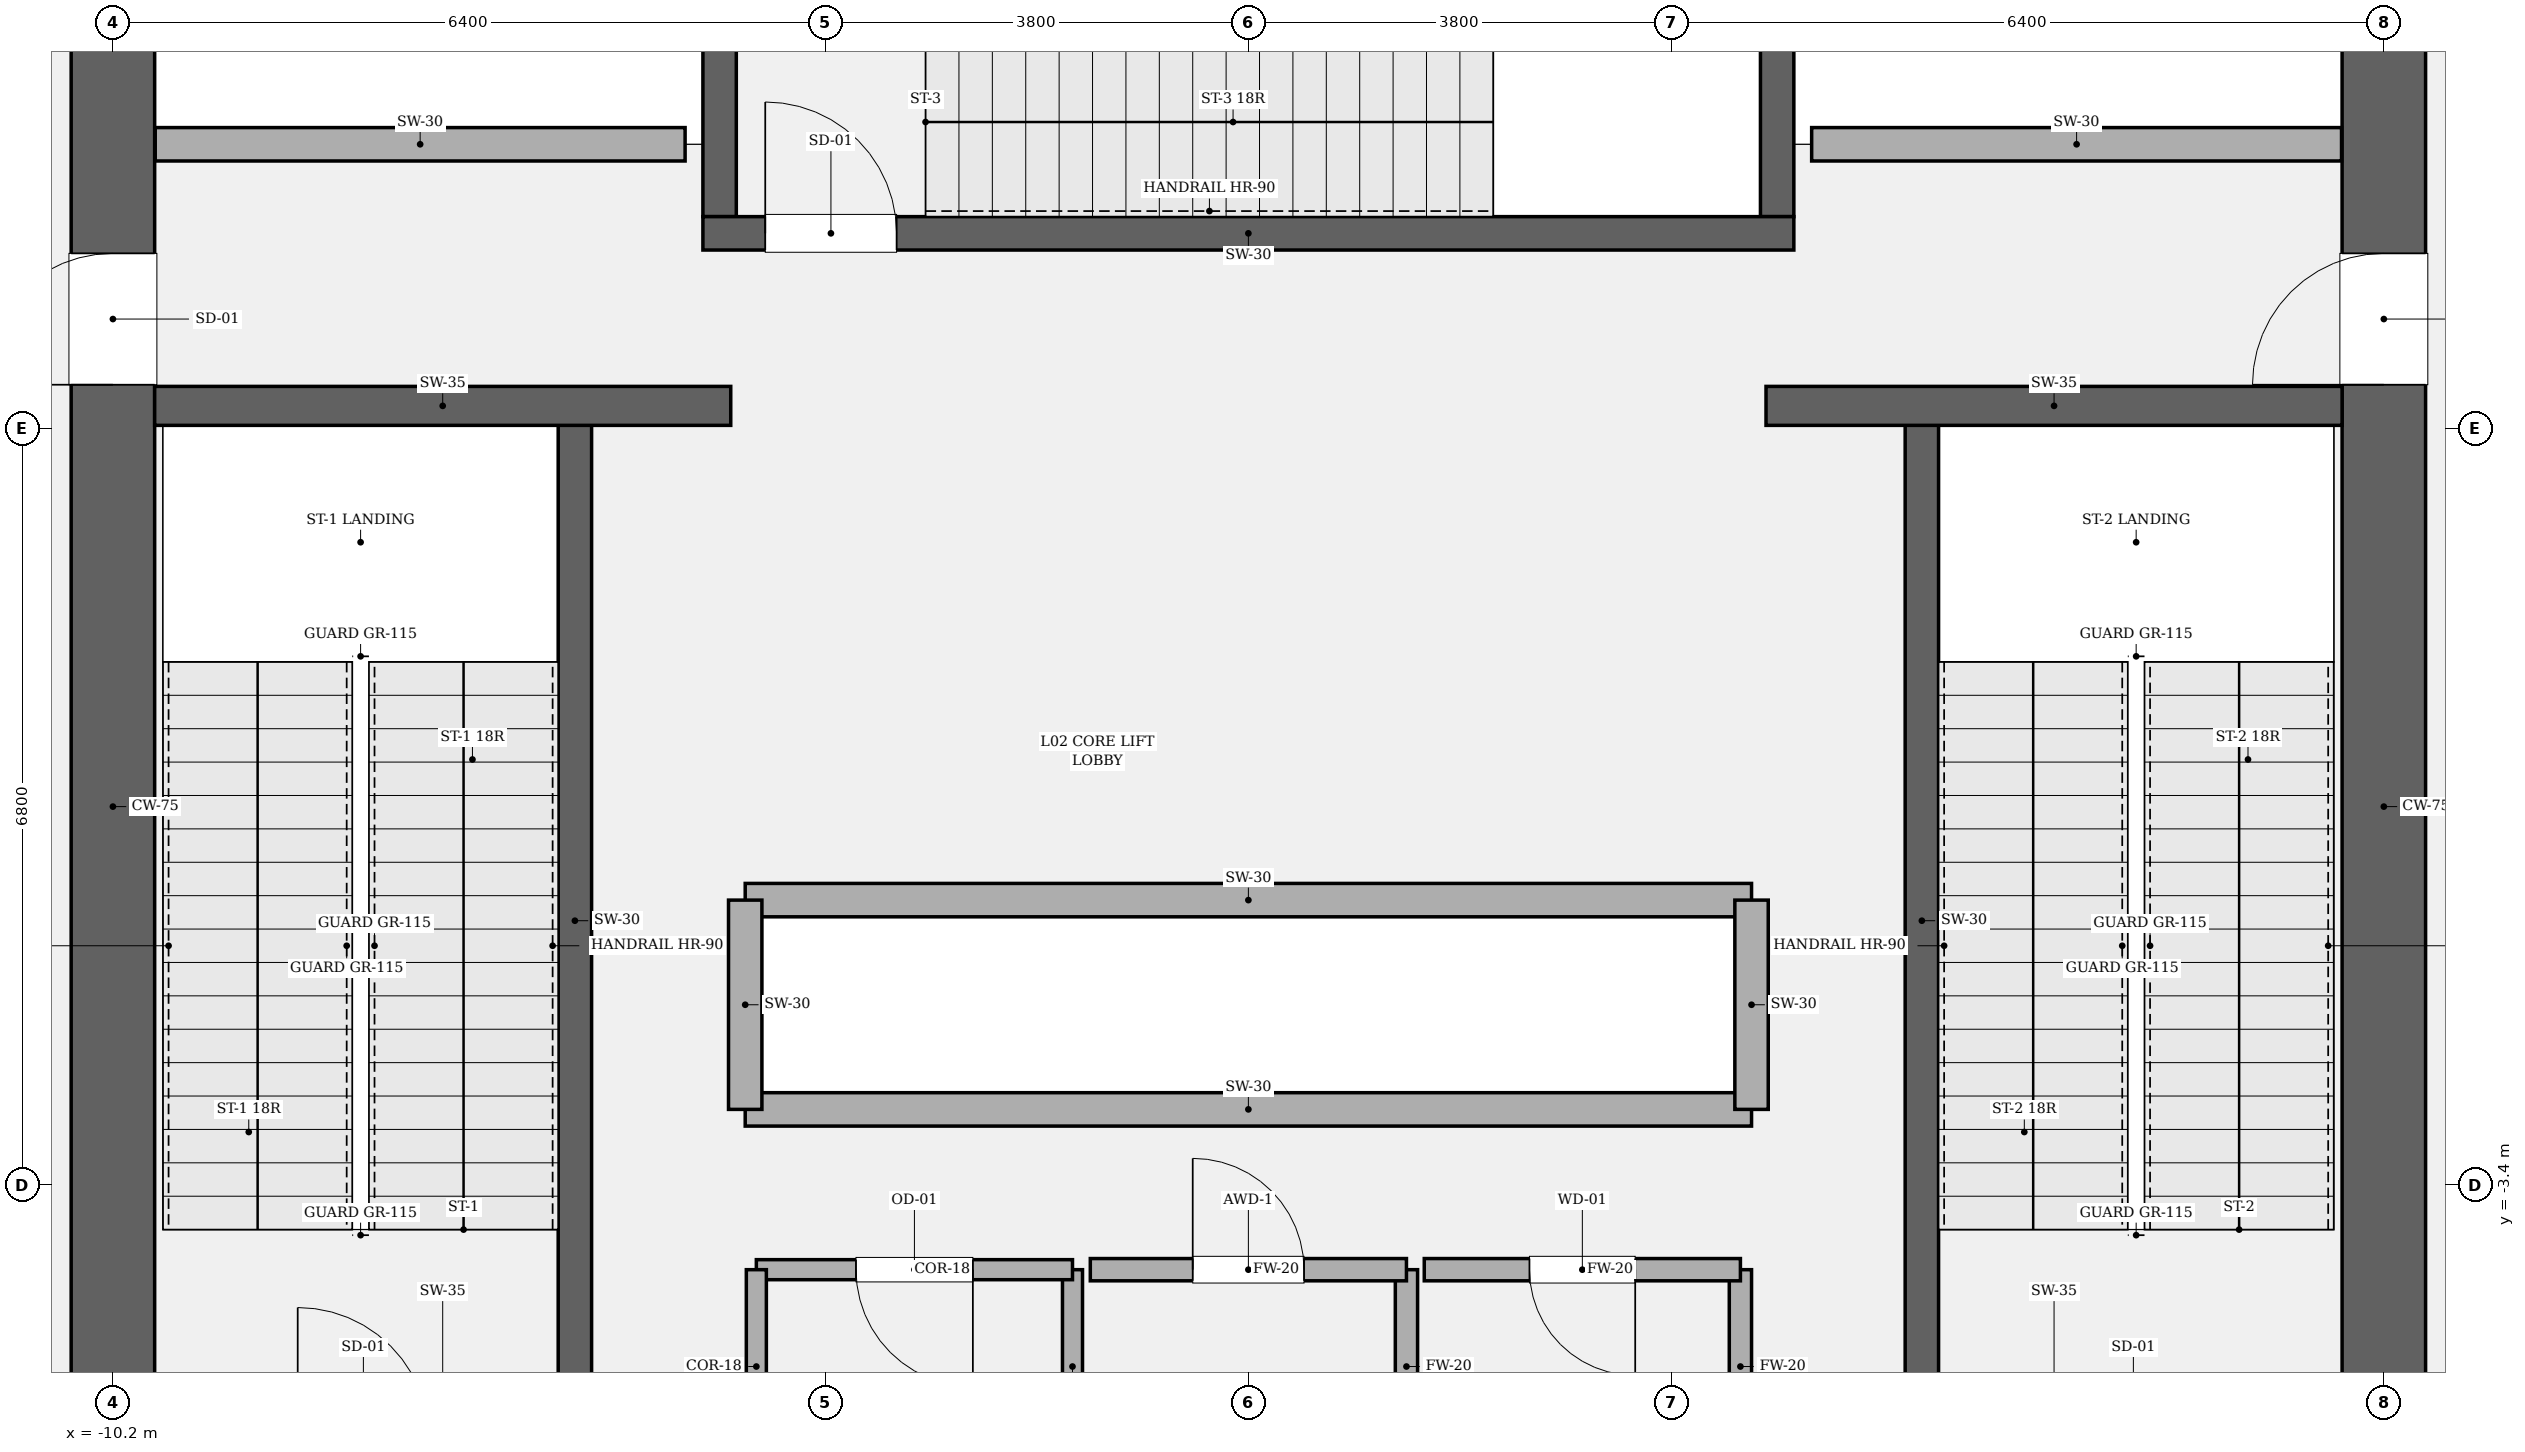
"""IFC4 building model, lengths in metres.
Left out: names, types, materials, properties, quantities, classifications, styles, units other than length and angle.
Written with IfcOpenShell. Run it as: python <this file> out.ifc"""

import sys

from ifc_helpers import new_model, si_unit, direction, frame, frame_2d, origin, place, context, subcontext, project, spatial, rectangle, extrude, element, fill, save


model = new_model("IFC4")
c1 = context("Model", 3, precision=1e-05, world=origin(), true_north=direction((0.0, 1.0)))
c2 = subcontext(c1, "Body", "Model", "MODEL_VIEW")
j1 = project(units=[si_unit("LENGTHUNIT", "METRE"), si_unit("PLANEANGLEUNIT", "RADIAN")], contexts=[c1])
p1 = place(None, origin())
s1 = spatial("IfcSite", under=j1, at=p1, CompositionType="ELEMENT")
p2 = place(p1, origin())
s2 = spatial("IfcBuilding", under=s1, at=p2, CompositionType="ELEMENT")
p3 = place(p2, frame((0.0, 0.0, 11.4)))
s3 = spatial("IfcBuildingStorey", under=s2, at=p3, CompositionType="ELEMENT", Elevation=11.4)
p4 = place(p3, frame((-10.2, -8.825, 0.0), z_axis=(0.0, 0.0, 1.0), x_axis=(0.0, 1.0, 0.0)))
e1 = element("IfcWall", 1, at=p4, inside=s3, PredefinedType="SHEAR", context=c2, shape_type="SweptSolid", body=[
    extrude(rectangle(XDim=17.65, YDim=0.75, at=frame_2d((8.825, 0.0))), origin(), (0.0, 0.0, 1.0), 5.4),
])
p5 = place(p4, frame((12.615, 0.0, 0.0)))
e2 = element("IfcOpeningElement", 2, at=p5, cuts=e1, PredefinedType="OPENING", context=c2, shape_type="SweptSolid", body=[
    extrude(rectangle(XDim=1.18, YDim=2.2, at=frame_2d((0.59, 1.1))), frame((0.0, 0.385, 0.0), z_axis=(0.0, -1.0, 0.0), x_axis=(1.0, 0.0, 0.0)), (0.0, 0.0, 1.0), 0.77),
])
p6 = place(p3, frame((10.2, 8.825, 0.0), z_axis=(0.0, 0.0, 1.0), x_axis=(0.0, -1.0, 0.0)))
e3 = element("IfcWall", 3, at=p6, inside=s3, PredefinedType="SHEAR", context=c2, shape_type="SweptSolid", body=[
    extrude(rectangle(XDim=17.65, YDim=0.75, at=frame_2d((8.825, 0.0))), origin(), (0.0, 0.0, 1.0), 5.4),
])
p7 = place(p6, frame((3.855, 0.0, 0.0)))
e4 = element("IfcOpeningElement", 4, at=p7, cuts=e3, PredefinedType="OPENING", context=c2, shape_type="SweptSolid", body=[
    extrude(rectangle(XDim=1.18, YDim=2.2, at=frame_2d((0.59, 1.1))), frame((0.0, 0.385, 0.0), z_axis=(0.0, -1.0, 0.0), x_axis=(1.0, 0.0, 0.0)), (0.0, 0.0, 1.0), 0.77),
])
for number, where, z_axis, x_axis in (
    (5, (-6.05, -5.5, 0.0), (0.0, 0.0, 1.0), (0.0, 1.0, 0.0)),
    (6, (6.05, 3.45, 0.0), (0.0, 0.0, 1.0), (0.0, -1.0, 0.0)),
):
    element("IfcWall", number, at=place(p3, frame(where, z_axis=z_axis, x_axis=x_axis)), inside=s3, PredefinedType="SOLIDWALL", context=c2, shape_type="SweptSolid", body=[
        extrude(rectangle(XDim=8.95, YDim=0.3, at=frame_2d((4.475, 0.0))), origin(), (0.0, 0.0, 1.0), 5.4),
    ])
for number, where, z_axis, x_axis in (
    (7, (-4.75, 5.3, 0.0), (0.0, 0.0, 1.0), (0.0, 1.0, 0.0)),
    (8, (4.75, 8.825, 0.0), (0.0, 0.0, 1.0), (0.0, -1.0, 0.0)),
):
    element("IfcWall", number, at=place(p3, frame(where, z_axis=z_axis, x_axis=x_axis)), inside=s3, PredefinedType="SOLIDWALL", context=c2, shape_type="SweptSolid", body=[
        extrude(rectangle(XDim=3.525, YDim=0.3, at=frame_2d((1.762, 0.0))), origin(), (0.0, 0.0, 1.0), 5.4),
    ])
p8 = place(p3, frame((-4.9, 5.15, 0.0), z_axis=(0.0, 0.0, 1.0), x_axis=(1.0, 0.0, 0.0)))
e9 = element("IfcWall", 9, at=p8, inside=s3, PredefinedType="SOLIDWALL", context=c2, shape_type="SweptSolid", body=[
    extrude(rectangle(XDim=9.8, YDim=0.3, at=frame_2d((4.9, 0.0))), origin(), (0.0, 0.0, 1.0), 5.4),
])
p9 = place(p8, frame((0.56, 0.0, 0.0)))
e10 = element("IfcOpeningElement", 10, at=p9, cuts=e9, PredefinedType="OPENING", context=c2, shape_type="SweptSolid", body=[
    extrude(rectangle(XDim=1.18, YDim=2.2, at=frame_2d((0.59, 1.1))), frame((0.0, 0.16, 0.0), z_axis=(0.0, -1.0, 0.0), x_axis=(1.0, 0.0, 0.0)), (0.0, 0.0, 1.0), 0.32),
])
for number, where, z_axis, x_axis in (
    (11, (-9.825, 3.6, 0.0), (0.0, 0.0, 1.0), (1.0, 0.0, 0.0)),
    (12, (4.65, 3.6, 0.0), (0.0, 0.0, 1.0), (1.0, 0.0, 0.0)),
):
    element("IfcWall", number, at=place(p3, frame(where, z_axis=z_axis, x_axis=x_axis)), inside=s3, PredefinedType="SOLIDWALL", context=c2, shape_type="SweptSolid", body=[
        extrude(rectangle(XDim=5.175, YDim=0.35, at=frame_2d((2.587, 0.0))), origin(), (0.0, 0.0, 1.0), 5.4),
    ])
for number, where, z_axis, x_axis in (
    (13, (-4.52, -0.84, 0.0), (0.0, 0.0, 1.0), (1.0, 0.0, 0.0)),
    (14, (-4.52, -2.72, 0.0), (0.0, 0.0, 1.0), (1.0, 0.0, 0.0)),
):
    element("IfcWall", number, at=place(p3, frame(where, z_axis=z_axis, x_axis=x_axis)), inside=s3, PredefinedType="SOLIDWALL", context=c2, shape_type="SweptSolid", body=[
        extrude(rectangle(XDim=9.04, YDim=0.3, at=frame_2d((4.52, 0.0))), origin(), (0.0, 0.0, 1.0), 5.12),
    ])
for number, where, z_axis, x_axis in (
    (15, (-4.52, -2.72, 0.0), (0.0, 0.0, 1.0), (0.0, 1.0, 0.0)),
    (16, (4.52, -2.72, 0.0), (0.0, 0.0, 1.0), (0.0, 1.0, 0.0)),
):
    element("IfcWall", number, at=place(p3, frame(where, z_axis=z_axis, x_axis=x_axis)), inside=s3, PredefinedType="SOLIDWALL", context=c2, shape_type="SweptSolid", body=[
        extrude(rectangle(XDim=1.88, YDim=0.3, at=frame_2d((0.94, 0.0))), origin(), (0.0, 0.0, 1.0), 5.12),
    ])
for number, where, z_axis, x_axis in (
    (17, (-9.82, 5.95, 0.0), (0.0, 0.0, 1.0), (1.0, 0.0, 0.0)),
    (18, (5.06, 5.95, 0.0), (0.0, 0.0, 1.0), (1.0, 0.0, 0.0)),
):
    element("IfcWall", number, at=place(p3, frame(where, z_axis=z_axis, x_axis=x_axis)), inside=s3, PredefinedType="SOLIDWALL", context=c2, shape_type="SweptSolid", body=[
        extrude(rectangle(XDim=4.76, YDim=0.3, at=frame_2d((2.38, 0.0))), origin(), (0.0, 0.0, 1.0), 5.12),
    ])
p10 = place(p3, frame((-1.58, -5.9, 0.0), z_axis=(0.0, 0.0, 1.0), x_axis=(0.0, 1.0, 0.0)))
e19 = element("IfcWall", 19, at=p10, inside=s3, PredefinedType="PARTITIONING", context=c2, shape_type="SweptSolid", body=[
    extrude(rectangle(XDim=1.74, YDim=0.18, at=frame_2d((0.87, 0.0))), origin(), (0.0, 0.0, 1.0), 5.12),
])
p11 = place(p3, frame((-1.58, -4.16, 0.0), z_axis=(0.0, 0.0, 1.0), x_axis=(-1.0, 0.0, 0.0)))
e20 = element("IfcWall", 20, at=p11, inside=s3, PredefinedType="PARTITIONING", context=c2, shape_type="SweptSolid", body=[
    extrude(rectangle(XDim=2.84, YDim=0.18, at=frame_2d((1.42, 0.0))), origin(), (0.0, 0.0, 1.0), 5.12),
])
p12 = place(p11, frame((0.895, 0.0, 0.0)))
e21 = element("IfcOpeningElement", 21, at=p12, cuts=e20, PredefinedType="OPENING", context=c2, shape_type="SweptSolid", body=[
    extrude(rectangle(XDim=1.05, YDim=2.2, at=frame_2d((0.525, 1.1))), frame((0.0, 0.1, 0.0), z_axis=(0.0, -1.0, 0.0), x_axis=(1.0, 0.0, 0.0)), (0.0, 0.0, 1.0), 0.2),
])
p13 = place(p3, frame((-4.42, -4.16, 0.0), z_axis=(0.0, 0.0, 1.0), x_axis=(0.0, -1.0, 0.0)))
e22 = element("IfcWall", 22, at=p13, inside=s3, PredefinedType="PARTITIONING", context=c2, shape_type="SweptSolid", body=[
    extrude(rectangle(XDim=1.74, YDim=0.18, at=frame_2d((0.87, 0.0))), origin(), (0.0, 0.0, 1.0), 5.12),
])
p14 = place(p3, frame((1.42, -5.9, 0.0), z_axis=(0.0, 0.0, 1.0), x_axis=(0.0, 1.0, 0.0)))
e23 = element("IfcWall", 23, at=p14, inside=s3, PredefinedType="SOLIDWALL", context=c2, shape_type="SweptSolid", body=[
    extrude(rectangle(XDim=1.74, YDim=0.2, at=frame_2d((0.87, 0.0))), origin(), (0.0, 0.0, 1.0), 5.12),
])
p15 = place(p3, frame((1.42, -4.16, 0.0), z_axis=(0.0, 0.0, 1.0), x_axis=(-1.0, 0.0, 0.0)))
e24 = element("IfcWall", 24, at=p15, inside=s3, PredefinedType="SOLIDWALL", context=c2, shape_type="SweptSolid", body=[
    extrude(rectangle(XDim=2.84, YDim=0.2, at=frame_2d((1.42, 0.0))), origin(), (0.0, 0.0, 1.0), 5.12),
])
p16 = place(p15, frame((0.92, 0.0, 0.0)))
e25 = element("IfcOpeningElement", 25, at=p16, cuts=e24, PredefinedType="OPENING", context=c2, shape_type="SweptSolid", body=[
    extrude(rectangle(XDim=1.0, YDim=2.15, at=frame_2d((0.5, 1.075))), frame((0.0, 0.11, 0.0), z_axis=(0.0, -1.0, 0.0), x_axis=(1.0, 0.0, 0.0)), (0.0, 0.0, 1.0), 0.22),
])
p17 = place(p3, frame((4.42, -5.9, 0.0), z_axis=(0.0, 0.0, 1.0), x_axis=(0.0, 1.0, 0.0)))
e26 = element("IfcWall", 26, at=p17, inside=s3, PredefinedType="SOLIDWALL", context=c2, shape_type="SweptSolid", body=[
    extrude(rectangle(XDim=1.74, YDim=0.2, at=frame_2d((0.87, 0.0))), origin(), (0.0, 0.0, 1.0), 5.12),
])
p18 = place(p3, frame((4.42, -4.16, 0.0), z_axis=(0.0, 0.0, 1.0), x_axis=(-1.0, 0.0, 0.0)))
e27 = element("IfcWall", 27, at=p18, inside=s3, PredefinedType="SOLIDWALL", context=c2, shape_type="SweptSolid", body=[
    extrude(rectangle(XDim=2.84, YDim=0.2, at=frame_2d((1.42, 0.0))), origin(), (0.0, 0.0, 1.0), 5.12),
])
p19 = place(p18, frame((0.945, 0.0, 0.0)))
e28 = element("IfcOpeningElement", 28, at=p19, cuts=e27, PredefinedType="OPENING", context=c2, shape_type="SweptSolid", body=[
    extrude(rectangle(XDim=0.95, YDim=2.15, at=frame_2d((0.475, 1.075))), frame((0.0, 0.11, 0.0), z_axis=(0.0, -1.0, 0.0), x_axis=(1.0, 0.0, 0.0)), (0.0, 0.0, 1.0), 0.22),
])
p20 = place(p9, origin())
e29 = element("IfcDoor", 29, at=p20, inside=s3, OperationType="SINGLE_SWING_LEFT", PredefinedType="DOOR", context=c2, shape_type="SweptSolid", body=[
    extrude(rectangle(XDim=1.18, YDim=2.2, at=frame_2d((0.59, 1.1))), frame((0.0, 0.025, 0.0), z_axis=(0.0, -1.0, 0.0), x_axis=(1.0, 0.0, 0.0)), (0.0, 0.0, 1.0), 0.05),
])
fill(e10, e29)
p21 = place(p5, origin())
e30 = element("IfcDoor", 30, at=p21, inside=s3, OperationType="SINGLE_SWING_LEFT", PredefinedType="DOOR", context=c2, shape_type="SweptSolid", body=[
    extrude(rectangle(XDim=1.18, YDim=2.2, at=frame_2d((0.59, 1.1))), frame((0.0, 0.025, 0.0), z_axis=(0.0, -1.0, 0.0), x_axis=(1.0, 0.0, 0.0)), (0.0, 0.0, 1.0), 0.05),
])
fill(e2, e30)
p22 = place(p7, origin())
e31 = element("IfcDoor", 31, at=p22, inside=s3, OperationType="SINGLE_SWING_RIGHT", PredefinedType="DOOR", context=c2, shape_type="SweptSolid", body=[
    extrude(rectangle(XDim=1.18, YDim=2.2, at=frame_2d((0.59, 1.1))), frame((0.0, 0.025, 0.0), z_axis=(0.0, -1.0, 0.0), x_axis=(1.0, 0.0, 0.0)), (0.0, 0.0, 1.0), 0.05),
])
fill(e4, e31)
p23 = place(p12, origin())
e32 = element("IfcDoor", 32, at=p23, inside=s3, OperationType="SINGLE_SWING_LEFT", PredefinedType="DOOR", context=c2, shape_type="SweptSolid", body=[
    extrude(rectangle(XDim=1.05, YDim=2.2, at=frame_2d((0.525, 1.1))), frame((0.0, 0.025, 0.0), z_axis=(0.0, -1.0, 0.0), x_axis=(1.0, 0.0, 0.0)), (0.0, 0.0, 1.0), 0.05),
])
fill(e21, e32)
p24 = place(p16, origin())
e33 = element("IfcDoor", 33, at=p24, inside=s3, OperationType="SINGLE_SWING_RIGHT", PredefinedType="DOOR", context=c2, shape_type="SweptSolid", body=[
    extrude(rectangle(XDim=1.0, YDim=2.15, at=frame_2d((0.5, 1.075))), frame((0.0, 0.025, 0.0), z_axis=(0.0, -1.0, 0.0), x_axis=(1.0, 0.0, 0.0)), (0.0, 0.0, 1.0), 0.05),
])
fill(e25, e33)
p25 = place(p19, origin())
e34 = element("IfcDoor", 34, at=p25, inside=s3, OperationType="SINGLE_SWING_LEFT", PredefinedType="DOOR", context=c2, shape_type="SweptSolid", body=[
    extrude(rectangle(XDim=0.95, YDim=2.15, at=frame_2d((0.475, 1.075))), frame((0.0, 0.025, 0.0), z_axis=(0.0, -1.0, 0.0), x_axis=(1.0, 0.0, 0.0)), (0.0, 0.0, 1.0), 0.05),
])
fill(e28, e34)
save(model, sys.argv[1])
